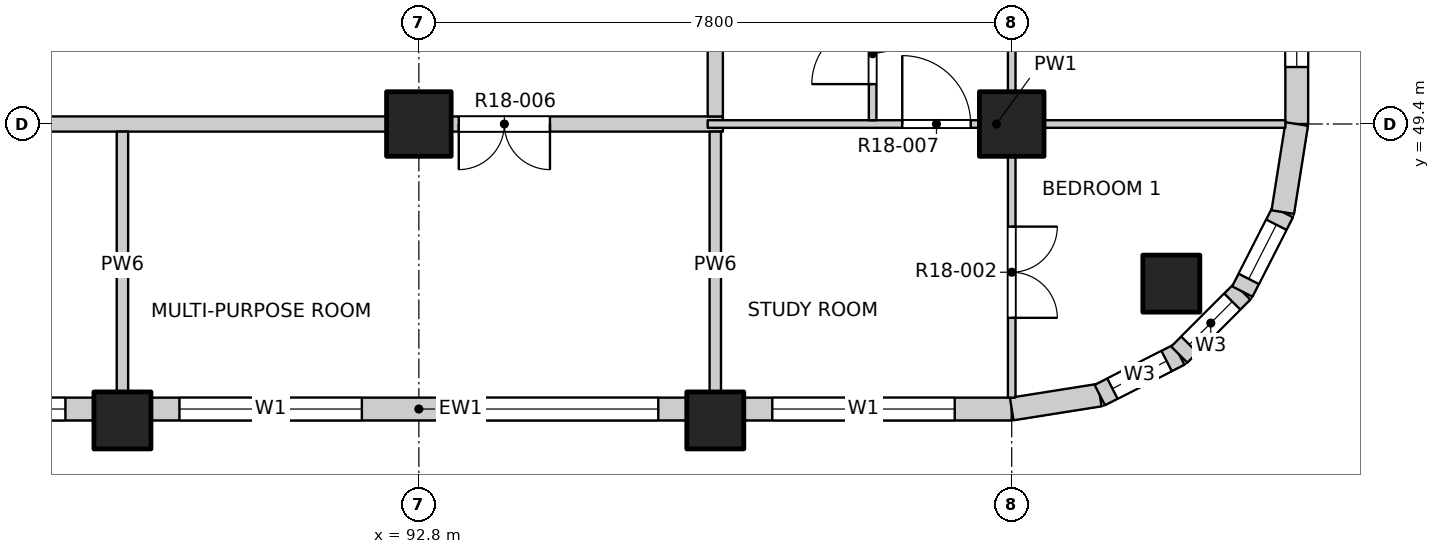
"""IFC4 building model, lengths in metres.
Left out: names, types, materials, properties, quantities, classifications, styles, units other than length and angle.
Written with IfcOpenShell. Run it as: python <this file> out.ifc"""

import sys

from ifc_helpers import new_model, si_unit, direction, frame, frame_2d, origin, origin_2d, place, context, subcontext, project, spatial, rectangle, extrude, element, fill, save


model = new_model("IFC4")
c1 = context("Model", 3, precision=1e-05, world=origin(), true_north=direction((0.0, 1.0)))
c2 = subcontext(c1, "Body", "Model", "MODEL_VIEW")
j1 = project(units=[si_unit("LENGTHUNIT", "METRE"), si_unit("PLANEANGLEUNIT", "RADIAN")], contexts=[c1])
p1 = place(None, origin())
s1 = spatial("IfcSite", under=j1, at=p1, CompositionType="ELEMENT")
p2 = place(p1, origin())
s2 = spatial("IfcBuilding", under=s1, at=p2, CompositionType="ELEMENT")
p3 = place(p2, frame((0.0, 0.0, 189.4)))
s3 = spatial("IfcBuildingStorey", under=s2, at=p3, CompositionType="ELEMENT", Elevation=189.4)
for number, where, z_axis, x_axis in (
    (1, (102.7, 47.3, -0.25), (0.0, 0.0, 1.0), (1.0, 0.0, 0.0)),
    (2, (88.9, 45.5, -0.25), (0.0, 0.0, 1.0), (1.0, 0.0, 0.0)),
    (3, (96.7, 45.5, -0.25), (0.0, 0.0, 1.0), (1.0, 0.0, 0.0)),
):
    element("IfcColumn", number, at=place(p3, frame(where, z_axis=z_axis, x_axis=x_axis)), inside=s3, PredefinedType="COLUMN", context=c2, shape_type="SweptSolid", body=[
        extrude(rectangle(XDim=0.75, YDim=0.75, at=origin_2d()), origin(), (0.0, 0.0, 1.0), 3.35),
    ])
for number, where, z_axis, x_axis in (
    (4, (92.8, 49.4, -0.25), (0.0, 0.0, 1.0), (1.0, 0.0, 0.0)),
    (5, (100.6, 49.4, -0.25), (0.0, 0.0, 1.0), (1.0, 0.0, 0.0)),
):
    element("IfcColumn", number, at=place(p3, frame(where, z_axis=z_axis, x_axis=x_axis)), inside=s3, PredefinedType="COLUMN", context=c2, shape_type="SweptSolid", body=[
        extrude(rectangle(XDim=0.85, YDim=0.85, at=origin_2d()), origin(), (0.0, 0.0, 1.0), 3.35),
    ])
p4 = place(p3, frame((81.475, 45.65, 0.0), z_axis=(0.0, 0.0, 1.0), x_axis=(1.0, 0.0, 0.0)))
e6 = element("IfcWall", 6, at=p4, inside=s3, PredefinedType="SOLIDWALL", context=c2, shape_type="SweptSolid", body=[
    extrude(rectangle(XDim=7.05, YDim=0.3, at=frame_2d((3.525, 0.0))), origin(), (0.0, 0.0, 1.0), 3.1),
])
p5 = place(p4, frame((0.375, 0.0, 0.9)))
e7 = element("IfcOpeningElement", 7, at=p5, cuts=e6, PredefinedType="OPENING", context=c2, shape_type="SweptSolid", body=[
    extrude(rectangle(XDim=2.4, YDim=1.8, at=frame_2d((1.2, 0.9))), frame((0.0, 0.16, 0.0), z_axis=(0.0, -1.0, 0.0), x_axis=(1.0, 0.0, 0.0)), (0.0, 0.0, 1.0), 0.32),
])
p6 = place(p4, frame((4.275, 0.0, 0.9)))
e8 = element("IfcOpeningElement", 8, at=p6, cuts=e6, PredefinedType="OPENING", context=c2, shape_type="SweptSolid", body=[
    extrude(rectangle(XDim=2.4, YDim=1.8, at=frame_2d((1.2, 0.9))), frame((0.0, 0.16, 0.0), z_axis=(0.0, -1.0, 0.0), x_axis=(1.0, 0.0, 0.0)), (0.0, 0.0, 1.0), 0.32),
])
p7 = place(p3, frame((89.275, 45.65, 0.0), z_axis=(0.0, 0.0, 1.0), x_axis=(1.0, 0.0, 0.0)))
e9 = element("IfcWall", 9, at=p7, inside=s3, PredefinedType="SOLIDWALL", context=c2, shape_type="SweptSolid", body=[
    extrude(rectangle(XDim=7.05, YDim=0.3, at=frame_2d((3.525, 0.0))), origin(), (0.0, 0.0, 1.0), 3.1),
])
p8 = place(p7, frame((0.375, 0.0, 0.9)))
e10 = element("IfcOpeningElement", 10, at=p8, cuts=e9, PredefinedType="OPENING", context=c2, shape_type="SweptSolid", body=[
    extrude(rectangle(XDim=2.4, YDim=1.8, at=frame_2d((1.2, 0.9))), frame((0.0, 0.16, 0.0), z_axis=(0.0, -1.0, 0.0), x_axis=(1.0, 0.0, 0.0)), (0.0, 0.0, 1.0), 0.32),
])
p9 = place(p7, frame((4.275, 0.0, 0.9)))
e11 = element("IfcOpeningElement", 11, at=p9, cuts=e9, PredefinedType="OPENING", context=c2, shape_type="SweptSolid", body=[
    extrude(rectangle(XDim=2.4, YDim=1.8, at=frame_2d((1.2, 0.9))), frame((0.0, 0.16, 0.0), z_axis=(0.0, -1.0, 0.0), x_axis=(1.0, 0.0, 0.0)), (0.0, 0.0, 1.0), 0.32),
])
p10 = place(p3, frame((97.075, 45.65, 0.0), z_axis=(0.0, 0.0, 1.0), x_axis=(1.0, 0.0, 0.0)))
e12 = element("IfcWall", 12, at=p10, inside=s3, PredefinedType="SOLIDWALL", context=c2, shape_type="SweptSolid", body=[
    extrude(rectangle(XDim=3.525, YDim=0.3, at=frame_2d((1.763, 0.0))), origin(), (0.0, 0.0, 1.0), 3.1),
])
p11 = place(p10, frame((0.375, 0.0, 0.9)))
e13 = element("IfcOpeningElement", 13, at=p11, cuts=e12, PredefinedType="OPENING", context=c2, shape_type="SweptSolid", body=[
    extrude(rectangle(XDim=2.4, YDim=1.8, at=frame_2d((1.2, 0.9))), frame((0.0, 0.16, 0.0), z_axis=(0.0, -1.0, 0.0), x_axis=(1.0, 0.0, 0.0)), (0.0, 0.0, 1.0), 0.32),
])
p12 = place(p3, frame((104.35, 49.4, 0.0), z_axis=(0.0, 0.0, 1.0), x_axis=(0.0, 1.0, 0.0)))
e14 = element("IfcWall", 14, at=p12, inside=s3, PredefinedType="SOLIDWALL", context=c2, shape_type="SweptSolid", body=[
    extrude(rectangle(XDim=3.525, YDim=0.3, at=frame_2d((1.763, 0.0))), origin(), (0.0, 0.0, 1.0), 3.1),
])
p13 = place(p12, frame((0.75, 0.0, 0.9)))
e15 = element("IfcOpeningElement", 15, at=p13, cuts=e14, PredefinedType="OPENING", context=c2, shape_type="SweptSolid", body=[
    extrude(rectangle(XDim=2.4, YDim=1.8, at=frame_2d((1.2, 0.9))), frame((0.0, 0.16, 0.0), z_axis=(0.0, -1.0, 0.0), x_axis=(1.0, 0.0, 0.0)), (0.0, 0.0, 1.0), 0.32),
])
p14 = place(p3, frame((100.6, 45.65, 0.0), z_axis=(0.0, 0.0, 1.0), x_axis=(0.987678452879, 0.156496880861, 0.0)))
e16 = element("IfcWall", 16, at=p14, inside=s3, PredefinedType="SOLIDWALL", context=c2, shape_type="SweptSolid", body=[
    extrude(rectangle(XDim=1.173, YDim=0.3, at=frame_2d((0.586, 0.0))), origin(), (0.0, 0.0, 1.0), 3.1),
])
p15 = place(p3, frame((101.759, 45.833, 0.0), z_axis=(0.0, 0.0, 1.0), x_axis=(0.890988677504, 0.454025524128, 0.0)))
e17 = element("IfcWall", 17, at=p15, inside=s3, PredefinedType="SOLIDWALL", context=c2, shape_type="SweptSolid", body=[
    extrude(rectangle(XDim=1.173, YDim=0.3, at=frame_2d((0.587, 0.0))), origin(), (0.0, 0.0, 1.0), 3.1),
])
p16 = place(p15, frame((0.187, 0.0, 0.9)))
e18 = element("IfcOpeningElement", 18, at=p16, cuts=e17, PredefinedType="OPENING", context=c2, shape_type="SweptSolid", body=[
    extrude(rectangle(XDim=0.8, YDim=1.2, at=frame_2d((0.4, 0.6))), frame((0.0, 0.16, 0.0), z_axis=(0.0, -1.0, 0.0), x_axis=(1.0, 0.0, 0.0)), (0.0, 0.0, 1.0), 0.32),
])
p17 = place(p3, frame((102.804, 46.366, 0.0), z_axis=(0.0, 0.0, 1.0), x_axis=(0.707106781187, 0.707106781187, 0.0)))
e19 = element("IfcWall", 19, at=p17, inside=s3, PredefinedType="SOLIDWALL", context=c2, shape_type="SweptSolid", body=[
    extrude(rectangle(XDim=1.173, YDim=0.3, at=frame_2d((0.586, 0.0))), origin(), (0.0, 0.0, 1.0), 3.1),
])
p18 = place(p17, frame((0.187, 0.0, 0.9)))
e20 = element("IfcOpeningElement", 20, at=p18, cuts=e19, PredefinedType="OPENING", context=c2, shape_type="SweptSolid", body=[
    extrude(rectangle(XDim=0.8, YDim=1.2, at=frame_2d((0.4, 0.6))), frame((0.0, 0.16, 0.0), z_axis=(0.0, -1.0, 0.0), x_axis=(1.0, 0.0, 0.0)), (0.0, 0.0, 1.0), 0.32),
])
p19 = place(p3, frame((103.634, 47.196, 0.0), z_axis=(0.0, 0.0, 1.0), x_axis=(0.454025524128, 0.890988677504, 0.0)))
e21 = element("IfcWall", 21, at=p19, inside=s3, PredefinedType="SOLIDWALL", context=c2, shape_type="SweptSolid", body=[
    extrude(rectangle(XDim=1.173, YDim=0.3, at=frame_2d((0.587, 0.0))), origin(), (0.0, 0.0, 1.0), 3.1),
])
p20 = place(p19, frame((0.187, 0.0, 0.9)))
e22 = element("IfcOpeningElement", 22, at=p20, cuts=e21, PredefinedType="OPENING", context=c2, shape_type="SweptSolid", body=[
    extrude(rectangle(XDim=0.8, YDim=1.2, at=frame_2d((0.4, 0.6))), frame((0.0, 0.16, 0.0), z_axis=(0.0, -1.0, 0.0), x_axis=(1.0, 0.0, 0.0)), (0.0, 0.0, 1.0), 0.32),
])
p21 = place(p3, frame((104.167, 48.241, 0.0), z_axis=(0.0, 0.0, 1.0), x_axis=(0.156496880861, 0.987678452879, 0.0)))
e23 = element("IfcWall", 23, at=p21, inside=s3, PredefinedType="SOLIDWALL", context=c2, shape_type="SweptSolid", body=[
    extrude(rectangle(XDim=1.173, YDim=0.3, at=frame_2d((0.586, 0.0))), origin(), (0.0, 0.0, 1.0), 3.1),
])
p22 = place(p3, frame((73.2, 49.4, 0.0), z_axis=(0.0, 0.0, 1.0), x_axis=(1.0, 0.0, 0.0)))
e24 = element("IfcWall", 24, at=p22, inside=s3, PredefinedType="PARTITIONING", context=c2, shape_type="SweptSolid", body=[
    extrude(rectangle(XDim=23.6, YDim=0.2, at=frame_2d((11.8, 0.0))), origin(), (0.0, 0.0, 1.0), 3.1),
])
p23 = place(p22, frame((4.525, 0.0, 0.0)))
e25 = element("IfcOpeningElement", 25, at=p23, cuts=e24, PredefinedType="OPENING", context=c2, shape_type="SweptSolid", body=[
    extrude(rectangle(XDim=1.2, YDim=2.1, at=frame_2d((0.6, 1.05))), frame((0.0, 0.11, 0.0), z_axis=(0.0, -1.0, 0.0), x_axis=(1.0, 0.0, 0.0)), (0.0, 0.0, 1.0), 0.22),
])
p24 = place(p22, frame((12.325, 0.0, 0.0)))
e26 = element("IfcOpeningElement", 26, at=p24, cuts=e24, PredefinedType="OPENING", context=c2, shape_type="SweptSolid", body=[
    extrude(rectangle(XDim=1.2, YDim=2.1, at=frame_2d((0.6, 1.05))), frame((0.0, 0.11, 0.0), z_axis=(0.0, -1.0, 0.0), x_axis=(1.0, 0.0, 0.0)), (0.0, 0.0, 1.0), 0.22),
])
p25 = place(p22, frame((20.125, 0.0, 0.0)))
e27 = element("IfcOpeningElement", 27, at=p25, cuts=e24, PredefinedType="OPENING", context=c2, shape_type="SweptSolid", body=[
    extrude(rectangle(XDim=1.2, YDim=2.1, at=frame_2d((0.6, 1.05))), frame((0.0, 0.11, 0.0), z_axis=(0.0, -1.0, 0.0), x_axis=(1.0, 0.0, 0.0)), (0.0, 0.0, 1.0), 0.22),
])
p26 = place(p3, frame((96.6, 49.4, 0.0), z_axis=(0.0, 0.0, 1.0), x_axis=(1.0, 0.0, 0.0)))
e28 = element("IfcWall", 28, at=p26, inside=s3, PredefinedType="PARTITIONING", context=c2, shape_type="SweptSolid", body=[
    extrude(rectangle(XDim=7.6, YDim=0.1, at=frame_2d((3.8, 0.0))), origin(), (0.0, 0.0, 1.0), 3.1),
])
p27 = place(p26, frame((2.56, 0.0, 0.0)))
e29 = element("IfcOpeningElement", 29, at=p27, cuts=e28, PredefinedType="OPENING", context=c2, shape_type="SweptSolid", body=[
    extrude(rectangle(XDim=0.9, YDim=2.1, at=frame_2d((0.45, 1.05))), frame((0.0, 0.06, 0.0), z_axis=(0.0, -1.0, 0.0), x_axis=(1.0, 0.0, 0.0)), (0.0, 0.0, 1.0), 0.12),
])
for number, where, z_axis, x_axis in (
    (30, (88.9, 45.8, 0.0), (0.0, 0.0, 1.0), (0.0, 1.0, 0.0)),
    (31, (96.7, 45.8, 0.0), (0.0, 0.0, 1.0), (0.0, 1.0, 0.0)),
):
    element("IfcWall", number, at=place(p3, frame(where, z_axis=z_axis, x_axis=x_axis)), inside=s3, PredefinedType="PARTITIONING", context=c2, shape_type="SweptSolid", body=[
        extrude(rectangle(XDim=3.5, YDim=0.15, at=frame_2d((1.75, 0.0))), origin(), (0.0, 0.0, 1.0), 3.1),
    ])
p28 = place(p3, frame((96.7, 49.5, 0.0), z_axis=(0.0, 0.0, 1.0), x_axis=(0.0, 1.0, 0.0)))
e32 = element("IfcWall", 32, at=p28, inside=s3, PredefinedType="PARTITIONING", context=c2, shape_type="SweptSolid", body=[
    extrude(rectangle(XDim=34.7, YDim=0.2, at=frame_2d((17.35, 0.0))), origin(), (0.0, 0.0, 1.0), 3.1),
])
p29 = place(p28, frame((7.425, 0.0, 0.0)))
e33 = element("IfcOpeningElement", 33, at=p29, cuts=e32, PredefinedType="OPENING", context=c2, shape_type="SweptSolid", body=[
    extrude(rectangle(XDim=1.0, YDim=2.1, at=frame_2d((0.5, 1.05))), frame((0.0, 0.11, 0.0), z_axis=(0.0, -1.0, 0.0), x_axis=(1.0, 0.0, 0.0)), (0.0, 0.0, 1.0), 0.22),
])
p30 = place(p28, frame((18.475, 0.0, 0.0)))
e34 = element("IfcOpeningElement", 34, at=p30, cuts=e32, PredefinedType="OPENING", context=c2, shape_type="SweptSolid", body=[
    extrude(rectangle(XDim=1.0, YDim=2.1, at=frame_2d((0.5, 1.05))), frame((0.0, 0.11, 0.0), z_axis=(0.0, -1.0, 0.0), x_axis=(1.0, 0.0, 0.0)), (0.0, 0.0, 1.0), 0.22),
])
p31 = place(p28, frame((29.025, 0.0, 0.0)))
e35 = element("IfcOpeningElement", 35, at=p31, cuts=e32, PredefinedType="OPENING", context=c2, shape_type="SweptSolid", body=[
    extrude(rectangle(XDim=1.0, YDim=2.1, at=frame_2d((0.5, 1.05))), frame((0.0, 0.11, 0.0), z_axis=(0.0, -1.0, 0.0), x_axis=(1.0, 0.0, 0.0)), (0.0, 0.0, 1.0), 0.22),
])
p32 = place(p3, frame((98.77, 49.45, 0.0), z_axis=(0.0, 0.0, 1.0), x_axis=(0.0, 1.0, 0.0)))
e36 = element("IfcWall", 36, at=p32, inside=s3, PredefinedType="PARTITIONING", context=c2, shape_type="SweptSolid", body=[
    extrude(rectangle(XDim=6.15, YDim=0.1, at=frame_2d((3.075, 0.0))), origin(), (0.0, 0.0, 1.0), 3.1),
])
p33 = place(p32, frame((0.475, 0.0, 0.0)))
e37 = element("IfcOpeningElement", 37, at=p33, cuts=e36, PredefinedType="OPENING", context=c2, shape_type="SweptSolid", body=[
    extrude(rectangle(XDim=0.8, YDim=2.1, at=frame_2d((0.4, 1.05))), frame((0.0, 0.06, 0.0), z_axis=(0.0, -1.0, 0.0), x_axis=(1.0, 0.0, 0.0)), (0.0, 0.0, 1.0), 0.12),
])
p34 = place(p32, frame((2.315, 0.0, 0.0)))
e38 = element("IfcOpeningElement", 38, at=p34, cuts=e36, PredefinedType="OPENING", context=c2, shape_type="SweptSolid", body=[
    extrude(rectangle(XDim=0.9, YDim=2.1, at=frame_2d((0.45, 1.05))), frame((0.0, 0.06, 0.0), z_axis=(0.0, -1.0, 0.0), x_axis=(1.0, 0.0, 0.0)), (0.0, 0.0, 1.0), 0.12),
])
p35 = place(p32, frame((4.515, 0.0, 0.0)))
e39 = element("IfcOpeningElement", 39, at=p35, cuts=e36, PredefinedType="OPENING", context=c2, shape_type="SweptSolid", body=[
    extrude(rectangle(XDim=0.9, YDim=2.1, at=frame_2d((0.45, 1.05))), frame((0.0, 0.06, 0.0), z_axis=(0.0, -1.0, 0.0), x_axis=(1.0, 0.0, 0.0)), (0.0, 0.0, 1.0), 0.12),
])
p36 = place(p3, frame((100.6, 45.8, 0.0), z_axis=(0.0, 0.0, 1.0), x_axis=(0.0, 1.0, 0.0)))
e40 = element("IfcWall", 40, at=p36, inside=s3, PredefinedType="PARTITIONING", context=c2, shape_type="SweptSolid", body=[
    extrude(rectangle(XDim=38.4, YDim=0.1, at=frame_2d((19.2, 0.0))), origin(), (0.0, 0.0, 1.0), 3.1),
])
p37 = place(p36, frame((1.05, 0.0, 0.0)))
e41 = element("IfcOpeningElement", 41, at=p37, cuts=e40, PredefinedType="OPENING", context=c2, shape_type="SweptSolid", body=[
    extrude(rectangle(XDim=1.2, YDim=2.1, at=frame_2d((0.6, 1.05))), frame((0.0, 0.06, 0.0), z_axis=(0.0, -1.0, 0.0), x_axis=(1.0, 0.0, 0.0)), (0.0, 0.0, 1.0), 0.12),
])
p38 = place(p36, frame((5.1, 0.0, 0.0)))
e42 = element("IfcOpeningElement", 42, at=p38, cuts=e40, PredefinedType="OPENING", context=c2, shape_type="SweptSolid", body=[
    extrude(rectangle(XDim=0.9, YDim=2.1, at=frame_2d((0.45, 1.05))), frame((0.0, 0.06, 0.0), z_axis=(0.0, -1.0, 0.0), x_axis=(1.0, 0.0, 0.0)), (0.0, 0.0, 1.0), 0.12),
])
p39 = place(p36, frame((9.0, 0.0, 0.0)))
e43 = element("IfcOpeningElement", 43, at=p39, cuts=e40, PredefinedType="OPENING", context=c2, shape_type="SweptSolid", body=[
    extrude(rectangle(XDim=0.9, YDim=2.1, at=frame_2d((0.45, 1.05))), frame((0.0, 0.06, 0.0), z_axis=(0.0, -1.0, 0.0), x_axis=(1.0, 0.0, 0.0)), (0.0, 0.0, 1.0), 0.12),
])
p40 = place(p36, frame((12.9, 0.0, 0.0)))
e44 = element("IfcOpeningElement", 44, at=p40, cuts=e40, PredefinedType="OPENING", context=c2, shape_type="SweptSolid", body=[
    extrude(rectangle(XDim=0.9, YDim=2.1, at=frame_2d((0.45, 1.05))), frame((0.0, 0.06, 0.0), z_axis=(0.0, -1.0, 0.0), x_axis=(1.0, 0.0, 0.0)), (0.0, 0.0, 1.0), 0.12),
])
p41 = place(p36, frame((19.725, 0.0, 0.0)))
e45 = element("IfcOpeningElement", 45, at=p41, cuts=e40, PredefinedType="OPENING", context=c2, shape_type="SweptSolid", body=[
    extrude(rectangle(XDim=1.2, YDim=2.1, at=frame_2d((0.6, 1.05))), frame((0.0, 0.06, 0.0), z_axis=(0.0, -1.0, 0.0), x_axis=(1.0, 0.0, 0.0)), (0.0, 0.0, 1.0), 0.12),
])
p42 = place(p36, frame((24.6, 0.0, 0.0)))
e46 = element("IfcOpeningElement", 46, at=p42, cuts=e40, PredefinedType="OPENING", context=c2, shape_type="SweptSolid", body=[
    extrude(rectangle(XDim=0.9, YDim=2.1, at=frame_2d((0.45, 1.05))), frame((0.0, 0.06, 0.0), z_axis=(0.0, -1.0, 0.0), x_axis=(1.0, 0.0, 0.0)), (0.0, 0.0, 1.0), 0.12),
])
p43 = place(p36, frame((28.5, 0.0, 0.0)))
e47 = element("IfcOpeningElement", 47, at=p43, cuts=e40, PredefinedType="OPENING", context=c2, shape_type="SweptSolid", body=[
    extrude(rectangle(XDim=0.9, YDim=2.1, at=frame_2d((0.45, 1.05))), frame((0.0, 0.06, 0.0), z_axis=(0.0, -1.0, 0.0), x_axis=(1.0, 0.0, 0.0)), (0.0, 0.0, 1.0), 0.12),
])
p44 = place(p36, frame((32.4, 0.0, 0.0)))
e48 = element("IfcOpeningElement", 48, at=p44, cuts=e40, PredefinedType="OPENING", context=c2, shape_type="SweptSolid", body=[
    extrude(rectangle(XDim=0.9, YDim=2.1, at=frame_2d((0.45, 1.05))), frame((0.0, 0.06, 0.0), z_axis=(0.0, -1.0, 0.0), x_axis=(1.0, 0.0, 0.0)), (0.0, 0.0, 1.0), 0.12),
])
p45 = place(p36, frame((36.15, 0.0, 0.0)))
e49 = element("IfcOpeningElement", 49, at=p45, cuts=e40, PredefinedType="OPENING", context=c2, shape_type="SweptSolid", body=[
    extrude(rectangle(XDim=1.2, YDim=2.1, at=frame_2d((0.6, 1.05))), frame((0.0, 0.06, 0.0), z_axis=(0.0, -1.0, 0.0), x_axis=(1.0, 0.0, 0.0)), (0.0, 0.0, 1.0), 0.12),
])
p46 = place(p6, origin())
e50 = element("IfcWindow", 50, at=p46, inside=s3, PartitioningType="DOUBLE_PANEL_VERTICAL", PredefinedType="WINDOW", context=c2, shape_type="SweptSolid", body=[
    extrude(rectangle(XDim=2.4, YDim=1.8, at=frame_2d((1.2, 0.9))), frame((0.0, 0.03, 0.0), z_axis=(0.0, -1.0, 0.0), x_axis=(1.0, 0.0, 0.0)), (0.0, 0.0, 1.0), 0.06),
])
fill(e8, e50)
p47 = place(p8, origin())
e51 = element("IfcWindow", 51, at=p47, inside=s3, PartitioningType="DOUBLE_PANEL_VERTICAL", PredefinedType="WINDOW", context=c2, shape_type="SweptSolid", body=[
    extrude(rectangle(XDim=2.4, YDim=1.8, at=frame_2d((1.2, 0.9))), frame((0.0, 0.03, 0.0), z_axis=(0.0, -1.0, 0.0), x_axis=(1.0, 0.0, 0.0)), (0.0, 0.0, 1.0), 0.06),
])
fill(e10, e51)
p48 = place(p9, origin())
e52 = element("IfcWindow", 52, at=p48, inside=s3, PartitioningType="DOUBLE_PANEL_VERTICAL", PredefinedType="WINDOW", context=c2, shape_type="SweptSolid", body=[
    extrude(rectangle(XDim=2.4, YDim=1.8, at=frame_2d((1.2, 0.9))), frame((0.0, 0.03, 0.0), z_axis=(0.0, -1.0, 0.0), x_axis=(1.0, 0.0, 0.0)), (0.0, 0.0, 1.0), 0.06),
])
fill(e11, e52)
p49 = place(p11, origin())
e53 = element("IfcWindow", 53, at=p49, inside=s3, PartitioningType="DOUBLE_PANEL_VERTICAL", PredefinedType="WINDOW", context=c2, shape_type="SweptSolid", body=[
    extrude(rectangle(XDim=2.4, YDim=1.8, at=frame_2d((1.2, 0.9))), frame((0.0, 0.03, 0.0), z_axis=(0.0, -1.0, 0.0), x_axis=(1.0, 0.0, 0.0)), (0.0, 0.0, 1.0), 0.06),
])
fill(e13, e53)
p50 = place(p13, origin())
e54 = element("IfcWindow", 54, at=p50, inside=s3, PartitioningType="DOUBLE_PANEL_VERTICAL", PredefinedType="WINDOW", context=c2, shape_type="SweptSolid", body=[
    extrude(rectangle(XDim=2.4, YDim=1.8, at=frame_2d((1.2, 0.9))), frame((0.0, 0.03, 0.0), z_axis=(0.0, -1.0, 0.0), x_axis=(1.0, 0.0, 0.0)), (0.0, 0.0, 1.0), 0.06),
])
fill(e15, e54)
p51 = place(p16, origin())
e55 = element("IfcWindow", 55, at=p51, inside=s3, PartitioningType="SINGLE_PANEL", PredefinedType="WINDOW", context=c2, shape_type="SweptSolid", body=[
    extrude(rectangle(XDim=0.8, YDim=1.2, at=frame_2d((0.4, 0.6))), frame((0.0, 0.03, 0.0), z_axis=(0.0, -1.0, 0.0), x_axis=(1.0, 0.0, 0.0)), (0.0, 0.0, 1.0), 0.06),
])
fill(e18, e55)
p52 = place(p18, origin())
e56 = element("IfcWindow", 56, at=p52, inside=s3, PartitioningType="SINGLE_PANEL", PredefinedType="WINDOW", context=c2, shape_type="SweptSolid", body=[
    extrude(rectangle(XDim=0.8, YDim=1.2, at=frame_2d((0.4, 0.6))), frame((0.0, 0.03, 0.0), z_axis=(0.0, -1.0, 0.0), x_axis=(1.0, 0.0, 0.0)), (0.0, 0.0, 1.0), 0.06),
])
fill(e20, e56)
p53 = place(p20, origin())
e57 = element("IfcWindow", 57, at=p53, inside=s3, PartitioningType="SINGLE_PANEL", PredefinedType="WINDOW", context=c2, shape_type="SweptSolid", body=[
    extrude(rectangle(XDim=0.8, YDim=1.2, at=frame_2d((0.4, 0.6))), frame((0.0, 0.03, 0.0), z_axis=(0.0, -1.0, 0.0), x_axis=(1.0, 0.0, 0.0)), (0.0, 0.0, 1.0), 0.06),
])
fill(e22, e57)
p54 = place(p37, origin())
e58 = element("IfcDoor", 58, at=p54, inside=s3, OperationType="DOUBLE_DOOR_SINGLE_SWING", PredefinedType="DOOR", context=c2, shape_type="SweptSolid", body=[
    extrude(rectangle(XDim=1.2, YDim=2.1, at=frame_2d((0.6, 1.05))), frame((0.0, 0.025, 0.0), z_axis=(0.0, -1.0, 0.0), x_axis=(1.0, 0.0, 0.0)), (0.0, 0.0, 1.0), 0.05),
])
fill(e41, e58)
p55 = place(p25, origin())
e59 = element("IfcDoor", 59, at=p55, inside=s3, OperationType="DOUBLE_DOOR_SINGLE_SWING", PredefinedType="DOOR", context=c2, shape_type="SweptSolid", body=[
    extrude(rectangle(XDim=1.2, YDim=2.1, at=frame_2d((0.6, 1.05))), frame((0.0, 0.025, 0.0), z_axis=(0.0, -1.0, 0.0), x_axis=(1.0, 0.0, 0.0)), (0.0, 0.0, 1.0), 0.05),
])
fill(e27, e59)
p56 = place(p27, origin())
e60 = element("IfcDoor", 60, at=p56, inside=s3, OperationType="SINGLE_SWING_LEFT", PredefinedType="DOOR", context=c2, shape_type="SweptSolid", body=[
    extrude(rectangle(XDim=0.9, YDim=2.1, at=frame_2d((0.45, 1.05))), frame((0.0, 0.025, 0.0), z_axis=(0.0, -1.0, 0.0), x_axis=(1.0, 0.0, 0.0)), (0.0, 0.0, 1.0), 0.05),
])
fill(e29, e60)
p57 = place(p33, origin())
e61 = element("IfcDoor", 61, at=p57, inside=s3, OperationType="SINGLE_SWING_LEFT", PredefinedType="DOOR", context=c2, shape_type="SweptSolid", body=[
    extrude(rectangle(XDim=0.8, YDim=2.1, at=frame_2d((0.4, 1.05))), frame((0.0, 0.025, 0.0), z_axis=(0.0, -1.0, 0.0), x_axis=(1.0, 0.0, 0.0)), (0.0, 0.0, 1.0), 0.05),
])
fill(e37, e61)
save(model, sys.argv[1])
